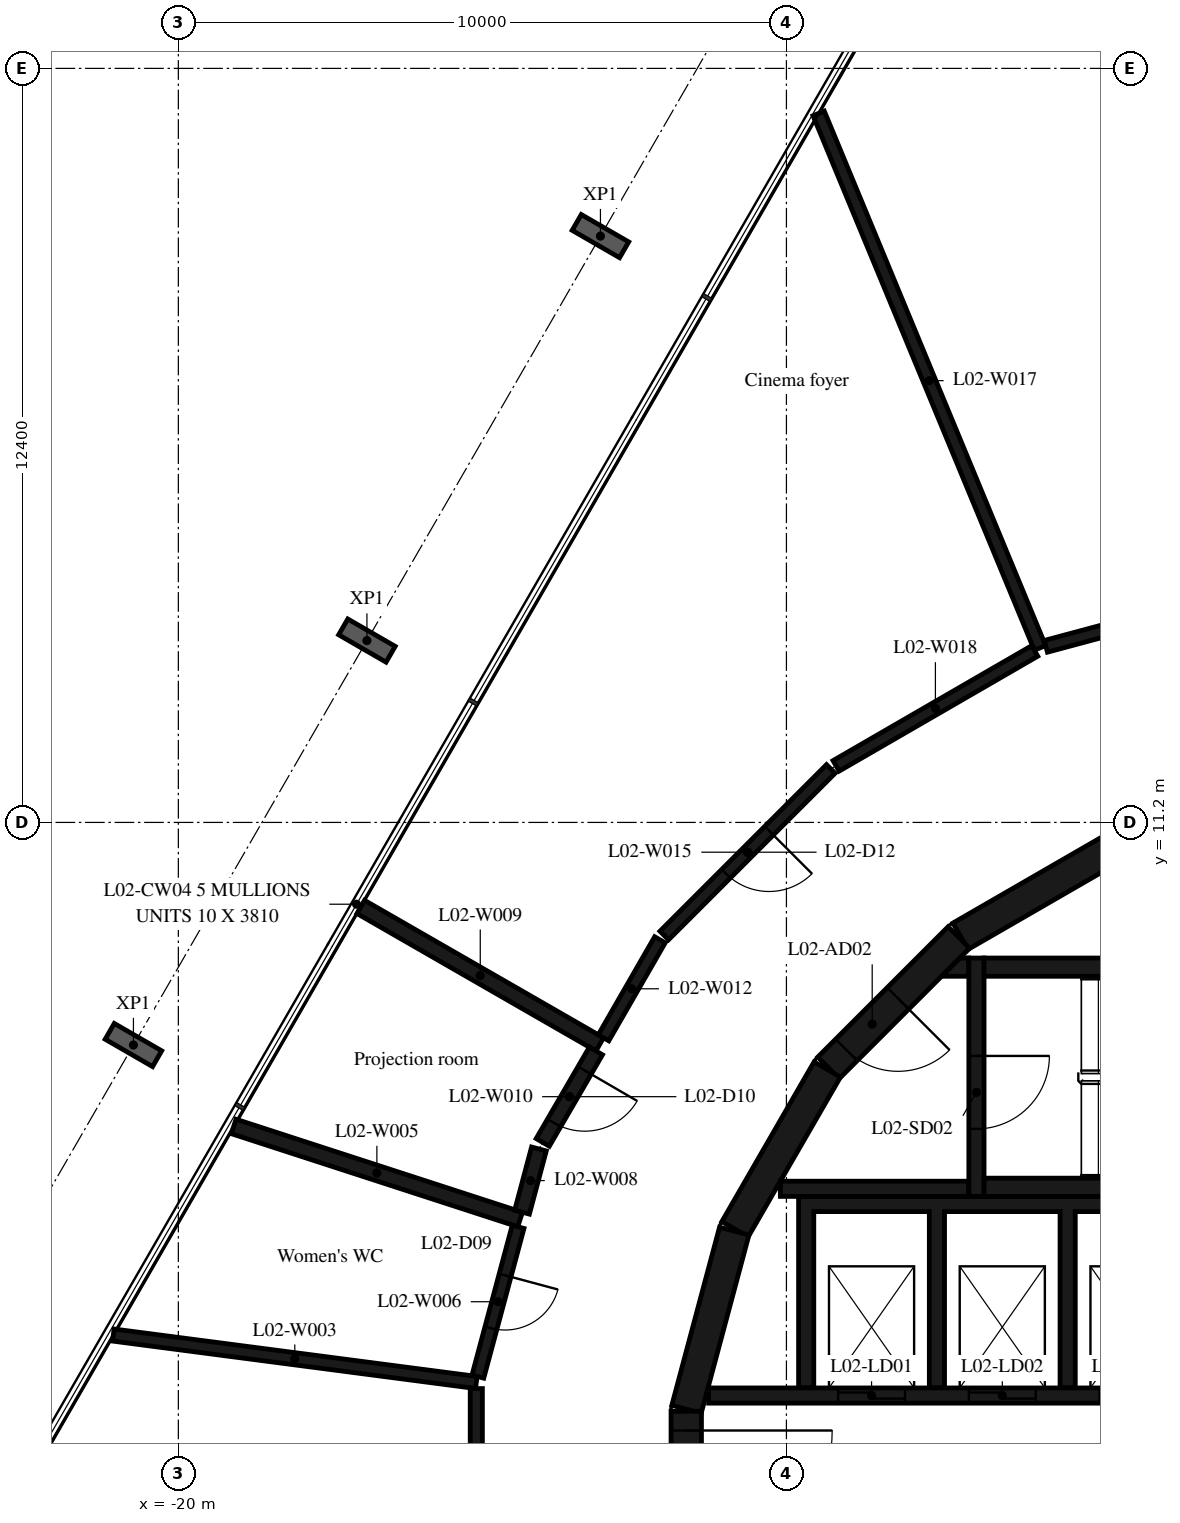
"""IFC4 building model, lengths in metres.
Left out: names, types, materials, properties, quantities, classifications, styles, units other than length and angle.
Written with IfcOpenShell. Run it as: python <this file> out.ifc"""

import sys

from ifc_helpers import new_model, si_unit, direction, frame, frame_2d, origin, origin_2d, place, context, subcontext, project, spatial, polyline, rectangle, i_section, outline, extrude, element, fill, save


model = new_model("IFC4")
c1 = context("Model", 3, precision=1e-05, world=origin(), true_north=direction((0.0, 1.0)))
c2 = subcontext(c1, "Body", "Model", "MODEL_VIEW")
j1 = project(units=[si_unit("LENGTHUNIT", "METRE"), si_unit("PLANEANGLEUNIT", "RADIAN")], contexts=[c1])
p1 = place(None, origin())
s1 = spatial("IfcSite", under=j1, at=p1, CompositionType="ELEMENT")
p2 = place(p1, origin())
s2 = spatial("IfcBuilding", under=s1, at=p2, CompositionType="ELEMENT")
p3 = place(p2, frame((0.0, 0.0, 13.8)))
s3 = spatial("IfcBuildingStorey", under=s2, at=p3, CompositionType="ELEMENT", Elevation=13.8)
for number, where, z_axis, x_axis in (
    (1, (-13.059, 20.842, -0.38), (0.0, 0.0, 1.0), (0.5, 0.866, 0.0)),
    (2, (-16.899, 14.19, -0.38), (0.0, 0.0, 1.0), (0.5, 0.866, 0.0)),
    (3, (-20.739, 7.539, -0.38), (0.0, 0.0, 1.0), (0.5, 0.866, 0.0)),
):
    element("IfcColumn", number, at=place(p3, frame(where, z_axis=z_axis, x_axis=x_axis)), inside=s3, PredefinedType="COLUMN", context=c2, shape_type="SweptSolid", body=[
        extrude(i_section(OverallWidth=0.3, OverallDepth=0.9, WebThickness=0.019, FlangeThickness=0.035, FilletRadius=0.03, at=origin_2d()), origin(), (0.0, 0.0, 1.0), 4.8),
    ])
p4 = place(p3, frame((-4.51, 10.845, 0.0), z_axis=(0.0, 0.0, 1.0), x_axis=(-0.865975092491, -0.500087131594, 0.0)))
e4 = element("IfcWall", 4, at=p4, inside=s3, PredefinedType="SHEAR", context=c2, shape_type="SweptSolid", body=[
    extrude(rectangle(XDim=3.033, YDim=0.5, at=frame_2d((1.516, 0.0))), origin(), (0.0, 0.0, 1.0), 4.42),
])
p5 = place(p3, frame((-7.164, 9.308, 0.0), z_axis=(0.0, 0.0, 1.0), x_axis=(-0.707106781187, -0.707106781187, 0.0)))
e5 = element("IfcWall", 5, at=p5, inside=s3, PredefinedType="SHEAR", context=c2, shape_type="SweptSolid", body=[
    extrude(rectangle(XDim=3.032, YDim=0.5, at=frame_2d((1.516, 0.0))), origin(), (0.0, 0.0, 1.0), 4.42),
])
p6 = place(p5, frame((1.416, 0.0, 0.0)))
e6 = element("IfcOpeningElement", 6, at=p6, cuts=e5, PredefinedType="OPENING", context=c2, shape_type="SweptSolid", body=[
    extrude(rectangle(XDim=1.2, YDim=2.1, at=frame_2d((0.6, 1.05))), frame((0.0, 0.26, 0.0), z_axis=(0.0, -1.0, 0.0), x_axis=(1.0, 0.0, 0.0)), (0.0, 0.0, 1.0), 0.52),
])
for number, where, z_axis, x_axis in (
    (7, (-9.329, 7.137, 0.0), (0.0, 0.0, 1.0), (-0.5, -0.866, 0.0)),
    (8, (-10.858, 4.479, 0.0), (0.0, 0.0, 1.0), (-0.259, -0.966, 0.0)),
):
    element("IfcWall", number, at=place(p3, frame(where, z_axis=z_axis, x_axis=x_axis)), inside=s3, PredefinedType="SHEAR", context=c2, shape_type="SweptSolid", body=[
        extrude(rectangle(XDim=3.033, YDim=0.5, at=frame_2d((1.516, 0.0))), origin(), (0.0, 0.0, 1.0), 4.42),
    ])
p7 = place(p3, frame((-11.647, 1.516, 0.0), z_axis=(0.0, 0.0, 1.0), x_axis=(0.0, -1.0, 0.0)))
e9 = element("IfcWall", 9, at=p7, inside=s3, PredefinedType="SHEAR", context=c2, shape_type="SweptSolid", body=[
    extrude(rectangle(XDim=3.033, YDim=0.5, at=frame_2d((1.516, 0.0))), origin(), (0.0, 0.0, 1.0), 4.42),
])
p8 = place(p7, frame((0.316, 0.0, 0.0)))
e10 = element("IfcOpeningElement", 10, at=p8, cuts=e9, PredefinedType="OPENING", context=c2, shape_type="SweptSolid", body=[
    extrude(rectangle(XDim=2.4, YDim=2.1, at=frame_2d((1.2, 1.05))), frame((0.0, 0.26, 0.0), z_axis=(0.0, -1.0, 0.0), x_axis=(1.0, 0.0, 0.0)), (0.0, 0.0, 1.0), 0.52),
])
for number, where, z_axis, x_axis in (
    (11, (-6.75, 5.2, 0.0), (0.0, 0.0, 1.0), (1.0, 0.0, 0.0)),
    (12, (-6.75, 8.82, 0.0), (0.0, 0.0, 1.0), (1.0, 0.0, 0.0)),
):
    element("IfcWall", number, at=place(p3, frame(where, z_axis=z_axis, x_axis=x_axis)), inside=s3, PredefinedType="SHEAR", context=c2, shape_type="SweptSolid", body=[
        extrude(rectangle(XDim=6.75, YDim=0.3, at=frame_2d((3.375, 0.0))), origin(), (0.0, 0.0, 1.0), 4.42),
    ])
p9 = place(p3, frame((-6.875, 8.97, 0.0), z_axis=(0.0, 0.0, 1.0), x_axis=(0.0, -1.0, 0.0)))
e13 = element("IfcWall", 13, at=p9, inside=s3, PredefinedType="SHEAR", context=c2, shape_type="SweptSolid", body=[
    extrude(rectangle(XDim=3.92, YDim=0.25, at=frame_2d((1.96, 0.0))), origin(), (0.0, 0.0, 1.0), 4.42),
])
p10 = place(p9, frame((1.61, 0.0, 0.0)))
e14 = element("IfcOpeningElement", 14, at=p10, cuts=e13, PredefinedType="OPENING", context=c2, shape_type="SweptSolid", body=[
    extrude(rectangle(XDim=1.2, YDim=2.1, at=frame_2d((0.6, 1.05))), frame((0.0, 0.135, 0.0), z_axis=(0.0, -1.0, 0.0), x_axis=(1.0, 0.0, 0.0)), (0.0, 0.0, 1.0), 0.27),
])
p11 = place(p3, frame((-7.0, 5.175, 0.0), z_axis=(0.0, 0.0, 1.0), x_axis=(-1.0, 0.0, 0.0)))
e15 = element("IfcWall", 15, at=p11, inside=s3, PredefinedType="SHEAR", context=c2, shape_type="SweptSolid", body=[
    extrude(rectangle(XDim=3.1, YDim=0.25, at=frame_2d((1.55, 0.0))), origin(), (0.0, 0.0, 1.0), 4.42),
])
p12 = place(p3, origin())
e16 = element("IfcWall", 16, at=p12, inside=s3, PredefinedType="SHEAR", context=c2, shape_type="SweptSolid", body=[
    extrude(outline(polyline([(-7.148, 8.97), (-7.0, 8.97), (-7.0, 8.67), (-7.448, 8.67), (-7.148, 8.97)])), origin(), (0.0, 0.0, 1.0), 4.42),
])
p13 = place(p3, origin())
e17 = element("IfcWall", 17, at=p13, inside=s3, PredefinedType="SHEAR", context=c2, shape_type="SweptSolid", body=[
    extrude(outline(polyline([(-9.55, 4.8), (-7.65, 4.8), (-7.65, 1.9), (-7.4, 1.9), (-7.4, 4.8), (-5.5, 4.8), (-5.5, 1.9), (-5.25, 1.9), (-5.25, 4.8), (-3.35, 4.8), (-3.35, 1.9), (-3.1, 1.9), (-3.1, 4.8), (-1.2, 4.8), (-1.2, 1.9), (-0.95, 1.9), (-0.95, 4.8), (0.95, 4.8), (0.95, 1.9), (1.2, 1.9), (1.2, 4.8), (3.1, 4.8), (3.1, 1.9), (3.35, 1.9), (3.35, 4.8), (5.25, 4.8), (5.25, 1.9), (5.5, 1.9), (5.5, 4.8), (7.4, 4.8), (7.4, 1.9), (7.65, 1.9), (7.65, 4.8), (9.55, 4.8), (9.55, 1.9), (9.8, 1.9), (9.8, 4.8), (9.8, 5.05), (-9.8, 5.05), (-9.8, 4.8), (-9.8, 1.9), (-9.55, 1.9), (-9.55, 4.8)])), origin(), (0.0, 0.0, 1.0), 4.42),
])
p14 = place(p3, frame((-11.28, 1.775, 0.0), z_axis=(0.0, 0.0, 1.0), x_axis=(1.0, 0.0, 0.0)))
e18 = element("IfcWall", 18, at=p14, inside=s3, PredefinedType="SHEAR", context=c2, shape_type="SweptSolid", body=[
    extrude(rectangle(XDim=14.38, YDim=0.25, at=frame_2d((7.19, 0.0))), origin(), (0.0, 0.0, 1.0), 4.42),
])
p15 = place(p14, frame((2.13, 0.0, 0.0)))
e19 = element("IfcOpeningElement", 19, at=p15, cuts=e18, PredefinedType="OPENING", context=c2, shape_type="SweptSolid", body=[
    extrude(rectangle(XDim=1.1, YDim=2.1, at=frame_2d((0.55, 1.05))), frame((0.0, 0.135, 0.0), z_axis=(0.0, -1.0, 0.0), x_axis=(1.0, 0.0, 0.0)), (0.0, 0.0, 1.0), 0.27),
])
p16 = place(p14, frame((4.28, 0.0, 0.0)))
e20 = element("IfcOpeningElement", 20, at=p16, cuts=e18, PredefinedType="OPENING", context=c2, shape_type="SweptSolid", body=[
    extrude(rectangle(XDim=1.1, YDim=2.1, at=frame_2d((0.55, 1.05))), frame((0.0, 0.135, 0.0), z_axis=(0.0, -1.0, 0.0), x_axis=(1.0, 0.0, 0.0)), (0.0, 0.0, 1.0), 0.27),
])
p17 = place(p14, frame((6.43, 0.0, 0.0)))
e21 = element("IfcOpeningElement", 21, at=p17, cuts=e18, PredefinedType="OPENING", context=c2, shape_type="SweptSolid", body=[
    extrude(rectangle(XDim=1.1, YDim=2.1, at=frame_2d((0.55, 1.05))), frame((0.0, 0.135, 0.0), z_axis=(0.0, -1.0, 0.0), x_axis=(1.0, 0.0, 0.0)), (0.0, 0.0, 1.0), 0.27),
])
p18 = place(p14, frame((8.58, 0.0, 0.0)))
e22 = element("IfcOpeningElement", 22, at=p18, cuts=e18, PredefinedType="OPENING", context=c2, shape_type="SweptSolid", body=[
    extrude(rectangle(XDim=1.1, YDim=2.1, at=frame_2d((0.55, 1.05))), frame((0.0, 0.135, 0.0), z_axis=(0.0, -1.0, 0.0), x_axis=(1.0, 0.0, 0.0)), (0.0, 0.0, 1.0), 0.27),
])
p19 = place(p14, frame((10.83, 0.0, 0.0)))
e23 = element("IfcOpeningElement", 23, at=p19, cuts=e18, PredefinedType="OPENING", context=c2, shape_type="SweptSolid", body=[
    extrude(rectangle(XDim=0.9, YDim=2.1, at=frame_2d((0.45, 1.05))), frame((0.0, 0.135, 0.0), z_axis=(0.0, -1.0, 0.0), x_axis=(1.0, 0.0, 0.0)), (0.0, 0.0, 1.0), 0.27),
])
p20 = place(p14, frame((12.98, 0.0, 0.0)))
e24 = element("IfcOpeningElement", 24, at=p20, cuts=e18, PredefinedType="OPENING", context=c2, shape_type="SweptSolid", body=[
    extrude(rectangle(XDim=0.9, YDim=2.1, at=frame_2d((0.45, 1.05))), frame((0.0, 0.135, 0.0), z_axis=(0.0, -1.0, 0.0), x_axis=(1.0, 0.0, 0.0)), (0.0, 0.0, 1.0), 0.27),
])
p21 = place(p3, frame((-15.1, 1.99, 0.0), z_axis=(0.0, 0.0, 1.0), x_axis=(-0.991571896529, 0.129557608858, 0.0)))
e25 = element("IfcWall", 25, at=p21, inside=s3, PredefinedType="PARTITIONING", context=c2, shape_type="SweptSolid", body=[
    extrude(rectangle(XDim=6.021, YDim=0.2, at=frame_2d((3.01, 0.0))), origin(), (0.0, 0.0, 1.0), 4.42),
])
p22 = place(p3, frame((-15.1, 1.89, 0.0), z_axis=(0.0, 0.0, 1.0), x_axis=(0.0, -1.0, 0.0)))
e26 = element("IfcWall", 26, at=p22, inside=s3, PredefinedType="PARTITIONING", context=c2, shape_type="SweptSolid", body=[
    extrude(rectangle(XDim=3.78, YDim=0.2, at=frame_2d((1.89, 0.0))), origin(), (0.0, 0.0, 1.0), 4.42),
])
p23 = place(p22, frame((1.44, 0.0, 0.0)))
e27 = element("IfcOpeningElement", 27, at=p23, cuts=e26, PredefinedType="OPENING", context=c2, shape_type="SweptSolid", body=[
    extrude(rectangle(XDim=0.9, YDim=2.1, at=frame_2d((0.45, 1.05))), frame((0.0, 0.11, 0.0), z_axis=(0.0, -1.0, 0.0), x_axis=(1.0, 0.0, 0.0)), (0.0, 0.0, 1.0), 0.22),
])
p24 = place(p3, frame((-14.38, 4.67, 0.0), z_axis=(0.0, 0.0, 1.0), x_axis=(-0.951080790776, 0.308942275219, 0.0)))
e28 = element("IfcWall", 28, at=p24, inside=s3, PredefinedType="PARTITIONING", context=c2, shape_type="SweptSolid", body=[
    extrude(rectangle(XDim=4.952, YDim=0.25, at=frame_2d((2.476, 0.0))), origin(), (0.0, 0.0, 1.0), 4.03),
])
p25 = place(p3, frame((-14.412, 4.549, 0.0), z_axis=(0.0, 0.0, 1.0), x_axis=(-0.25946184252, -0.965753359961, 0.0)))
e29 = element("IfcWall", 29, at=p25, inside=s3, PredefinedType="PARTITIONING", context=c2, shape_type="SweptSolid", body=[
    extrude(rectangle(XDim=2.55, YDim=0.2, at=frame_2d((1.275, 0.0))), origin(), (0.0, 0.0, 1.0), 4.42),
])
p26 = place(p25, frame((0.825, 0.0, 0.0)))
e30 = element("IfcOpeningElement", 30, at=p26, cuts=e29, PredefinedType="OPENING", context=c2, shape_type="SweptSolid", body=[
    extrude(rectangle(XDim=0.9, YDim=2.1, at=frame_2d((0.45, 1.05))), frame((0.0, 0.11, 0.0), z_axis=(0.0, -1.0, 0.0), x_axis=(1.0, 0.0, 0.0)), (0.0, 0.0, 1.0), 0.22),
])
p27 = place(p3, frame((-14.07, 5.83, 0.0), z_axis=(0.0, 0.0, 1.0), x_axis=(-0.258044022259, -0.966133159857, 0.0)))
e31 = element("IfcWall", 31, at=p27, inside=s3, PredefinedType="PARTITIONING", context=c2, shape_type="SweptSolid", body=[
    extrude(rectangle(XDim=1.076, YDim=0.25, at=frame_2d((0.538, 0.0))), origin(), (0.0, 0.0, 1.0), 4.42),
])
p28 = place(p3, frame((-13.07, 7.55, 0.0), z_axis=(0.0, 0.0, 1.0), x_axis=(-0.866877794005, 0.498520701938, 0.0)))
e32 = element("IfcWall", 32, at=p28, inside=s3, PredefinedType="PARTITIONING", context=c2, shape_type="SweptSolid", body=[
    extrude(rectangle(XDim=4.533, YDim=0.25, at=frame_2d((2.267, 0.0))), origin(), (0.0, 0.0, 1.0), 4.42),
])
p29 = place(p3, frame((-13.133, 7.442, 0.0), z_axis=(0.0, 0.0, 1.0), x_axis=(-0.502578988357, -0.864531295247, 0.0)))
e33 = element("IfcWall", 33, at=p29, inside=s3, PredefinedType="PARTITIONING", context=c2, shape_type="SweptSolid", body=[
    extrude(rectangle(XDim=1.74, YDim=0.25, at=frame_2d((0.87, 0.0))), origin(), (0.0, 0.0, 1.0), 4.42),
])
p30 = place(p29, frame((0.37, 0.0, 0.0)))
e34 = element("IfcOpeningElement", 34, at=p30, cuts=e33, PredefinedType="OPENING", context=c2, shape_type="SweptSolid", body=[
    extrude(rectangle(XDim=1.0, YDim=2.1, at=frame_2d((0.5, 1.05))), frame((0.0, 0.135, 0.0), z_axis=(0.0, -1.0, 0.0), x_axis=(1.0, 0.0, 0.0)), (0.0, 0.0, 1.0), 0.27),
])
p31 = place(p3, frame((-12.08, 9.27, 0.0), z_axis=(0.0, 0.0, 1.0), x_axis=(-0.498809049979, -0.86671190811, 0.0)))
e35 = element("IfcWall", 35, at=p31, inside=s3, PredefinedType="PARTITIONING", context=c2, shape_type="SweptSolid", body=[
    extrude(rectangle(XDim=1.859, YDim=0.2, at=frame_2d((0.93, 0.0))), origin(), (0.0, 0.0, 1.0), 4.42),
])
p32 = place(p3, frame((-9.27, 12.08, 0.0), z_axis=(0.0, 0.0, 1.0), x_axis=(-0.707106781187, -0.707106781187, 0.0)))
e36 = element("IfcWall", 36, at=p32, inside=s3, PredefinedType="PARTITIONING", context=c2, shape_type="SweptSolid", body=[
    extrude(rectangle(XDim=3.874, YDim=0.2, at=frame_2d((1.937, 0.0))), origin(), (0.0, 0.0, 1.0), 4.42),
])
p33 = place(p32, frame((1.437, 0.0, 0.0)))
e37 = element("IfcOpeningElement", 37, at=p33, cuts=e36, PredefinedType="OPENING", context=c2, shape_type="SweptSolid", body=[
    extrude(rectangle(XDim=1.0, YDim=2.1, at=frame_2d((0.5, 1.05))), frame((0.0, 0.11, 0.0), z_axis=(0.0, -1.0, 0.0), x_axis=(1.0, 0.0, 0.0)), (0.0, 0.0, 1.0), 0.22),
])
p34 = place(p3, frame((-5.83, 14.07, 0.0), z_axis=(0.0, 0.0, 1.0), x_axis=(-0.382588257379, 0.923918949538, 0.0)))
e38 = element("IfcWall", 38, at=p34, inside=s3, PredefinedType="PARTITIONING", context=c2, shape_type="SweptSolid", body=[
    extrude(rectangle(XDim=9.514, YDim=0.2, at=frame_2d((4.757, 0.0))), origin(), (0.0, 0.0, 1.0), 4.42),
])
p35 = place(p3, frame((-5.917, 14.02, 0.0), z_axis=(0.0, 0.0, 1.0), x_axis=(-0.865591582237, -0.500750649286, 0.0)))
e39 = element("IfcWall", 39, at=p35, inside=s3, PredefinedType="PARTITIONING", context=c2, shape_type="SweptSolid", body=[
    extrude(rectangle(XDim=3.774, YDim=0.2, at=frame_2d((1.887, 0.0))), origin(), (0.0, 0.0, 1.0), 4.42),
])
p36 = place(p3, frame((-1.99, 15.1, 0.0), z_axis=(0.0, 0.0, 1.0), x_axis=(-0.96585437197, -0.259085569159, 0.0)))
e40 = element("IfcWall", 40, at=p36, inside=s3, PredefinedType="PARTITIONING", context=c2, shape_type="SweptSolid", body=[
    extrude(rectangle(XDim=3.876, YDim=0.2, at=frame_2d((1.938, 0.0))), origin(), (0.0, 0.0, 1.0), 4.42),
])
p37 = place(p10, origin())
e41 = element("IfcDoor", 41, at=p37, inside=s3, OperationType="SINGLE_SWING_LEFT", PredefinedType="DOOR", context=c2, shape_type="SweptSolid", body=[
    extrude(rectangle(XDim=1.2, YDim=2.1, at=frame_2d((0.6, 1.05))), frame((0.0, 0.025, 0.0), z_axis=(0.0, -1.0, 0.0), x_axis=(1.0, 0.0, 0.0)), (0.0, 0.0, 1.0), 0.05),
])
fill(e14, e41)
p38 = place(p6, origin())
e42 = element("IfcDoor", 42, at=p38, inside=s3, OperationType="SINGLE_SWING_RIGHT", PredefinedType="DOOR", context=c2, shape_type="SweptSolid", body=[
    extrude(rectangle(XDim=1.2, YDim=2.1, at=frame_2d((0.6, 1.05))), frame((0.0, 0.025, 0.0), z_axis=(0.0, -1.0, 0.0), x_axis=(1.0, 0.0, 0.0)), (0.0, 0.0, 1.0), 0.05),
])
fill(e6, e42)
p39 = place(p8, origin())
e43 = element("IfcDoor", 43, at=p39, inside=s3, OperationType="DOUBLE_DOOR_SINGLE_SWING", PredefinedType="DOOR", context=c2, shape_type="SweptSolid", body=[
    extrude(rectangle(XDim=2.4, YDim=2.1, at=frame_2d((1.2, 1.05))), frame((0.0, 0.025, 0.0), z_axis=(0.0, -1.0, 0.0), x_axis=(1.0, 0.0, 0.0)), (0.0, 0.0, 1.0), 0.05),
])
fill(e10, e43)
p40 = place(p15, origin())
e44 = element("IfcDoor", 44, at=p40, inside=s3, OperationType="DOUBLE_DOOR_SLIDING", PredefinedType="DOOR", context=c2, shape_type="SweptSolid", body=[
    extrude(rectangle(XDim=1.1, YDim=2.1, at=frame_2d((0.55, 1.05))), frame((0.0, 0.025, 0.0), z_axis=(0.0, -1.0, 0.0), x_axis=(1.0, 0.0, 0.0)), (0.0, 0.0, 1.0), 0.05),
])
fill(e19, e44)
p41 = place(p16, origin())
e45 = element("IfcDoor", 45, at=p41, inside=s3, OperationType="DOUBLE_DOOR_SLIDING", PredefinedType="DOOR", context=c2, shape_type="SweptSolid", body=[
    extrude(rectangle(XDim=1.1, YDim=2.1, at=frame_2d((0.55, 1.05))), frame((0.0, 0.025, 0.0), z_axis=(0.0, -1.0, 0.0), x_axis=(1.0, 0.0, 0.0)), (0.0, 0.0, 1.0), 0.05),
])
fill(e20, e45)
p42 = place(p17, origin())
e46 = element("IfcDoor", 46, at=p42, inside=s3, OperationType="DOUBLE_DOOR_SLIDING", PredefinedType="DOOR", context=c2, shape_type="SweptSolid", body=[
    extrude(rectangle(XDim=1.1, YDim=2.1, at=frame_2d((0.55, 1.05))), frame((0.0, 0.025, 0.0), z_axis=(0.0, -1.0, 0.0), x_axis=(1.0, 0.0, 0.0)), (0.0, 0.0, 1.0), 0.05),
])
fill(e21, e46)
p43 = place(p26, origin())
e47 = element("IfcDoor", 47, at=p43, inside=s3, OperationType="SINGLE_SWING_LEFT", PredefinedType="DOOR", context=c2, shape_type="SweptSolid", body=[
    extrude(rectangle(XDim=0.9, YDim=2.1, at=frame_2d((0.45, 1.05))), frame((0.0, 0.025, 0.0), z_axis=(0.0, -1.0, 0.0), x_axis=(1.0, 0.0, 0.0)), (0.0, 0.0, 1.0), 0.05),
])
fill(e30, e47)
p44 = place(p30, origin())
e48 = element("IfcDoor", 48, at=p44, inside=s3, OperationType="SINGLE_SWING_LEFT", PredefinedType="DOOR", context=c2, shape_type="SweptSolid", body=[
    extrude(rectangle(XDim=1.0, YDim=2.1, at=frame_2d((0.5, 1.05))), frame((0.0, 0.025, 0.0), z_axis=(0.0, -1.0, 0.0), x_axis=(1.0, 0.0, 0.0)), (0.0, 0.0, 1.0), 0.05),
])
fill(e34, e48)
p45 = place(p33, origin())
e49 = element("IfcDoor", 49, at=p45, inside=s3, OperationType="SINGLE_SWING_LEFT", PredefinedType="DOOR", context=c2, shape_type="SweptSolid", body=[
    extrude(rectangle(XDim=1.0, YDim=2.1, at=frame_2d((0.5, 1.05))), frame((0.0, 0.025, 0.0), z_axis=(0.0, -1.0, 0.0), x_axis=(1.0, 0.0, 0.0)), (0.0, 0.0, 1.0), 0.05),
])
fill(e37, e49)
save(model, sys.argv[1])
